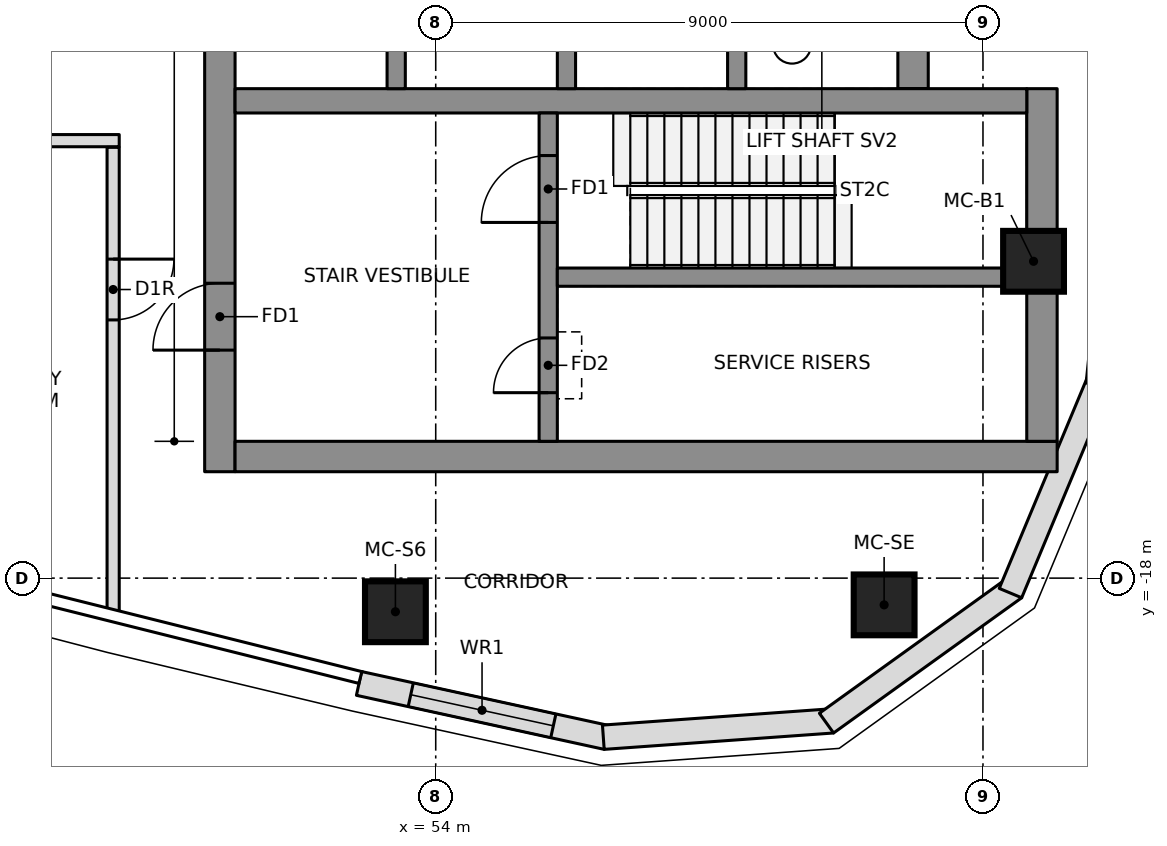
"""IFC4 building model, lengths in metres.
Left out: names, types, materials, properties, quantities, classifications, styles, units other than length and angle.
Written with IfcOpenShell. Run it as: python <this file> out.ifc"""

import sys

from ifc_helpers import new_model, si_unit, direction, frame, frame_2d, origin, origin_2d, place, context, subcontext, project, spatial, polyline, rectangle, outline, extrude, element, fill, save


model = new_model("IFC4")
c1 = context("Model", 3, precision=1e-05, world=origin(), true_north=direction((0.0, 1.0)))
c2 = subcontext(c1, "Body", "Model", "MODEL_VIEW")
j1 = project(units=[si_unit("LENGTHUNIT", "METRE"), si_unit("PLANEANGLEUNIT", "RADIAN")], contexts=[c1])
p1 = place(None, origin())
s1 = spatial("IfcSite", under=j1, at=p1, CompositionType="ELEMENT")
p2 = place(p1, origin())
s2 = spatial("IfcBuilding", under=s1, at=p2, CompositionType="ELEMENT")
p3 = place(p2, frame((0.0, 0.0, 308.6)))
s3 = spatial("IfcBuildingStorey", under=s2, at=p3, CompositionType="ELEMENT", Elevation=308.6)
p4 = place(p3, frame((50.45, -16.25, 0.0), z_axis=(0.0, 0.0, 1.0), x_axis=(0.0, 1.0, 0.0)))
e1 = element("IfcWall", 1, at=p4, inside=s3, PredefinedType="SHEAR", context=c2, shape_type="SweptSolid", body=[
    extrude(rectangle(XDim=9.6, YDim=0.5, at=frame_2d((4.8, 0.0))), origin(), (0.0, 0.0, 1.0), 4.6),
])
p5 = place(p4, frame((2.0, 0.0, 0.0)))
e2 = element("IfcOpeningElement", 2, at=p5, cuts=e1, PredefinedType="OPENING", context=c2, shape_type="SweptSolid", body=[
    extrude(rectangle(XDim=1.1, YDim=2.1, at=frame_2d((0.55, 1.05))), frame((0.0, 0.26, 0.0), z_axis=(0.0, -1.0, 0.0), x_axis=(1.0, 0.0, 0.0)), (0.0, 0.0, 1.0), 0.52),
])
p6 = place(p3, frame((50.7, -16.0, 0.0), z_axis=(0.0, 0.0, 1.0), x_axis=(1.0, 0.0, 0.0)))
e3 = element("IfcWall", 3, at=p6, inside=s3, PredefinedType="SHEAR", context=c2, shape_type="SweptSolid", body=[
    extrude(rectangle(XDim=13.52, YDim=0.5, at=frame_2d((6.76, 0.0))), origin(), (0.0, 0.0, 1.0), 4.6),
])
p7 = place(p3, frame((63.97, -15.75, 0.0), z_axis=(0.0, 0.0, 1.0), x_axis=(0.0, 1.0, 0.0)))
e4 = element("IfcWall", 4, at=p7, inside=s3, PredefinedType="SHEAR", context=c2, shape_type="SweptSolid", body=[
    extrude(rectangle(XDim=5.8, YDim=0.5, at=frame_2d((2.9, 0.0))), origin(), (0.0, 0.0, 1.0), 4.6),
])
p8 = place(p3, frame((61.85, -9.95, 0.0), z_axis=(0.0, 0.0, 1.0), x_axis=(0.0, 1.0, 0.0)))
e5 = element("IfcWall", 5, at=p8, inside=s3, PredefinedType="SHEAR", context=c2, shape_type="SweptSolid", body=[
    extrude(rectangle(XDim=19.9, YDim=0.5, at=frame_2d((9.95, 0.0))), origin(), (0.0, 0.0, 1.0), 4.6),
])
p9 = place(p3, frame((50.7, -10.15, 0.0), z_axis=(0.0, 0.0, 1.0), x_axis=(1.0, 0.0, 0.0)))
e6 = element("IfcWall", 6, at=p9, inside=s3, PredefinedType="SHEAR", context=c2, shape_type="SweptSolid", body=[
    extrude(rectangle(XDim=13.02, YDim=0.4, at=frame_2d((6.51, 0.0))), origin(), (0.0, 0.0, 1.0), 4.6),
])
for number, where, z_axis, x_axis in (
    (7, (53.35, -9.95, 0.0), (0.0, 0.0, 1.0), (0.0, 1.0, 0.0)),
    (8, (56.15, -9.95, 0.0), (0.0, 0.0, 1.0), (0.0, 1.0, 0.0)),
    (9, (58.95, -9.95, 0.0), (0.0, 0.0, 1.0), (0.0, 1.0, 0.0)),
):
    element("IfcWall", number, at=place(p3, frame(where, z_axis=z_axis, x_axis=x_axis)), inside=s3, PredefinedType="SHEAR", context=c2, shape_type="SweptSolid", body=[
        extrude(rectangle(XDim=3.0, YDim=0.3, at=frame_2d((1.5, 0.0))), origin(), (0.0, 0.0, 1.0), 4.6),
    ])
p10 = place(p3, frame((55.85, -15.75, 0.0), z_axis=(0.0, 0.0, 1.0), x_axis=(0.0, 1.0, 0.0)))
e10 = element("IfcWall", 10, at=p10, inside=s3, PredefinedType="SHEAR", context=c2, shape_type="SweptSolid", body=[
    extrude(rectangle(XDim=5.4, YDim=0.3, at=frame_2d((2.7, 0.0))), origin(), (0.0, 0.0, 1.0), 4.6),
])
p11 = place(p10, frame((3.6, 0.0, 0.0)))
e11 = element("IfcOpeningElement", 11, at=p11, cuts=e10, PredefinedType="OPENING", context=c2, shape_type="SweptSolid", body=[
    extrude(rectangle(XDim=1.1, YDim=2.1, at=frame_2d((0.55, 1.05))), frame((0.0, 0.16, 0.0), z_axis=(0.0, -1.0, 0.0), x_axis=(1.0, 0.0, 0.0)), (0.0, 0.0, 1.0), 0.32),
])
p12 = place(p10, frame((0.8, 0.0, 0.0)))
e12 = element("IfcOpeningElement", 12, at=p12, cuts=e10, PredefinedType="OPENING", context=c2, shape_type="SweptSolid", body=[
    extrude(rectangle(XDim=0.9, YDim=2.1, at=frame_2d((0.45, 1.05))), frame((0.0, 0.16, 0.0), z_axis=(0.0, -1.0, 0.0), x_axis=(1.0, 0.0, 0.0)), (0.0, 0.0, 1.0), 0.32),
])
p13 = place(p3, frame((56.0, -13.05, 0.0), z_axis=(0.0, 0.0, 1.0), x_axis=(1.0, 0.0, 0.0)))
e13 = element("IfcWall", 13, at=p13, inside=s3, PredefinedType="SHEAR", context=c2, shape_type="SweptSolid", body=[
    extrude(rectangle(XDim=7.72, YDim=0.3, at=frame_2d((3.86, 0.0))), origin(), (0.0, 0.0, 1.0), 4.6),
])
for number, where, z_axis, x_axis in (
    (14, (53.337, -18.553, 0.0), (0.0, 0.0, 1.0), (1.0, 0.0, 0.0)),
    (15, (61.374, -18.44, 0.0), (0.0, 0.0, 1.0), (1.0, 0.0, 0.0)),
    (16, (63.832, -12.789, 0.0), (0.0, 0.0, 1.0), (1.0, 0.0, 0.0)),
):
    element("IfcColumn", number, at=place(p3, frame(where, z_axis=z_axis, x_axis=x_axis)), inside=s3, PredefinedType="COLUMN", context=c2, shape_type="SweptSolid", body=[
        extrude(rectangle(XDim=1.0, YDim=1.0, at=origin_2d()), origin(), (0.0, 0.0, 1.0), 4.6),
    ])
p14 = place(p3, frame((52.738, -19.732, 0.0), z_axis=(0.0, 0.0, 1.0), x_axis=(0.977020225348, -0.213146614471, 0.0)))
e17 = element("IfcWall", 17, at=p14, inside=s3, PredefinedType="NOTDEFINED", context=c2, shape_type="SweptSolid", body=[
    extrude(outline(polyline([(0.0, -0.2), (4.171, -0.2), (4.113, 0.2), (0.0, 0.2), (0.0, -0.2)])), origin(), (0.0, 0.0, 1.0), 4.3),
])
p15 = place(p14, frame((0.871, 0.0, 0.3)))
e18 = element("IfcOpeningElement", 18, at=p15, cuts=e17, PredefinedType="OPENING", context=c2, shape_type="SweptSolid", body=[
    extrude(rectangle(XDim=2.4, YDim=3.0, at=frame_2d((1.2, 1.5))), frame((0.0, 0.21, 0.0), z_axis=(0.0, -1.0, 0.0), x_axis=(1.0, 0.0, 0.0)), (0.0, 0.0, 1.0), 0.42),
])
p16 = place(p3, frame((56.785, -20.615, 0.0), z_axis=(0.0, 0.0, 1.0), x_axis=(0.99746272096, 0.071190731806, 0.0)))
e19 = element("IfcWall", 19, at=p16, inside=s3, PredefinedType="NOTDEFINED", context=c2, shape_type="SweptSolid", body=[
    extrude(outline(polyline([(-0.029, -0.2), (3.753, -0.2), (3.64, 0.2), (0.029, 0.2), (-0.029, -0.2)])), origin(), (0.0, 0.0, 1.0), 4.3),
])
p17 = place(p3, frame((60.472, -20.352, 0.0), z_axis=(0.0, 0.0, 1.0), x_axis=(0.811962548682, 0.583709533533, 0.0)))
e20 = element("IfcWall", 20, at=p17, inside=s3, PredefinedType="NOTDEFINED", context=c2, shape_type="SweptSolid", body=[
    extrude(outline(polyline([(-0.057, -0.2), (3.753, -0.2), (3.64, 0.2), (0.057, 0.2), (-0.057, -0.2)])), origin(), (0.0, 0.0, 1.0), 4.3),
])
p18 = place(p3, frame((63.474, -18.194, 0.0), z_axis=(0.0, 0.0, 1.0), x_axis=(0.385285857918, 0.922797273343, 0.0)))
e21 = element("IfcWall", 21, at=p18, inside=s3, PredefinedType="NOTDEFINED", context=c2, shape_type="SweptSolid", body=[
    extrude(outline(polyline([(-0.057, -0.2), (3.726, -0.2), (3.667, 0.2), (0.057, 0.2), (-0.057, -0.2)])), origin(), (0.0, 0.0, 1.0), 4.3),
])
p19 = place(p3, frame((64.898, -14.782, 0.0), z_axis=(0.0, 0.0, 1.0), x_axis=(0.102249826987, 0.994758751096, 0.0)))
e22 = element("IfcWall", 22, at=p19, inside=s3, PredefinedType="NOTDEFINED", context=c2, shape_type="SweptSolid", body=[
    extrude(outline(polyline([(-0.03, -0.2), (4.237, -0.2), (4.23, 0.2), (0.03, 0.2), (-0.03, -0.2)])), origin(), (0.0, 0.0, 1.0), 4.3),
])
p20 = place(p19, frame((1.417, 0.0, 0.3)))
e23 = element("IfcOpeningElement", 23, at=p20, cuts=e22, PredefinedType="OPENING", context=c2, shape_type="SweptSolid", body=[
    extrude(rectangle(XDim=2.4, YDim=3.0, at=frame_2d((1.2, 1.5))), frame((0.0, 0.21, 0.0), z_axis=(0.0, -1.0, 0.0), x_axis=(1.0, 0.0, 0.0)), (0.0, 0.0, 1.0), 0.42),
])
p21 = place(p3, frame((43.199, -10.805, 0.0), z_axis=(0.0, 0.0, 1.0), x_axis=(0.999999999048, -4.3628114e-05, 0.0)))
e24 = element("IfcWall", 24, at=p21, inside=s3, PredefinedType="PARTITIONING", context=c2, shape_type="SweptSolid", body=[
    extrude(rectangle(XDim=5.596, YDim=0.2, at=frame_2d((2.798, 0.0))), origin(), (0.0, 0.0, 1.0), 4.3),
])
p22 = place(p21, frame((1.301, 0.0, 0.0)))
e25 = element("IfcOpeningElement", 25, at=p22, cuts=e24, PredefinedType="OPENING", context=c2, shape_type="SweptSolid", body=[
    extrude(rectangle(XDim=1.0, YDim=2.1, at=frame_2d((0.5, 1.05))), frame((0.0, 0.11, 0.0), z_axis=(0.0, -1.0, 0.0), x_axis=(1.0, 0.0, 0.0)), (0.0, 0.0, 1.0), 0.22),
])
p23 = place(p3, frame((48.695, -10.915, 0.0), z_axis=(0.0, 0.0, 1.0), x_axis=(0.0, -1.0, 0.0)))
e26 = element("IfcWall", 26, at=p23, inside=s3, PredefinedType="PARTITIONING", context=c2, shape_type="SweptSolid", body=[
    extrude(rectangle(XDim=7.674, YDim=0.2, at=frame_2d((3.837, 0.0))), origin(), (0.0, 0.0, 1.0), 4.3),
])
p24 = place(p23, frame((1.838, 0.0, 0.0)))
e27 = element("IfcOpeningElement", 27, at=p24, cuts=e26, PredefinedType="OPENING", context=c2, shape_type="SweptSolid", body=[
    extrude(rectangle(XDim=1.0, YDim=2.1, at=frame_2d((0.5, 1.05))), frame((0.0, 0.11, 0.0), z_axis=(0.0, -1.0, 0.0), x_axis=(1.0, 0.0, 0.0)), (0.0, 0.0, 1.0), 0.22),
])
p25 = place(p15, origin())
e28 = element("IfcWindow", 28, at=p25, inside=s3, PartitioningType="SINGLE_PANEL", PredefinedType="WINDOW", context=c2, shape_type="SweptSolid", body=[
    extrude(rectangle(XDim=2.4, YDim=3.0, at=frame_2d((1.2, 1.5))), frame((0.0, 0.17, 0.0), z_axis=(0.0, -1.0, 0.0), x_axis=(1.0, 0.0, 0.0)), (0.0, 0.0, 1.0), 0.06),
])
fill(e18, e28)
p26 = place(p24, origin())
e29 = element("IfcDoor", 29, at=p26, inside=s3, OperationType="SINGLE_SWING_RIGHT", PredefinedType="DOOR", context=c2, shape_type="SweptSolid", body=[
    extrude(rectangle(XDim=1.0, YDim=2.1, at=frame_2d((0.5, 1.05))), frame((0.0, 0.025, 0.0), z_axis=(0.0, -1.0, 0.0), x_axis=(1.0, 0.0, 0.0)), (0.0, 0.0, 1.0), 0.05),
])
fill(e27, e29)
p27 = place(p11, origin())
e30 = element("IfcDoor", 30, at=p27, inside=s3, OperationType="SINGLE_SWING_RIGHT", PredefinedType="DOOR", context=c2, shape_type="SweptSolid", body=[
    extrude(rectangle(XDim=1.1, YDim=2.1, at=frame_2d((0.55, 1.05))), frame((0.0, 0.025, 0.0), z_axis=(0.0, -1.0, 0.0), x_axis=(1.0, 0.0, 0.0)), (0.0, 0.0, 1.0), 0.05),
])
fill(e11, e30)
p28 = place(p5, origin())
e31 = element("IfcDoor", 31, at=p28, inside=s3, OperationType="SINGLE_SWING_RIGHT", PredefinedType="DOOR", context=c2, shape_type="SweptSolid", body=[
    extrude(rectangle(XDim=1.1, YDim=2.1, at=frame_2d((0.55, 1.05))), frame((0.0, 0.025, 0.0), z_axis=(0.0, -1.0, 0.0), x_axis=(1.0, 0.0, 0.0)), (0.0, 0.0, 1.0), 0.05),
])
fill(e2, e31)
p29 = place(p12, origin())
e32 = element("IfcDoor", 32, at=p29, inside=s3, OperationType="SINGLE_SWING_LEFT", PredefinedType="DOOR", context=c2, shape_type="SweptSolid", body=[
    extrude(rectangle(XDim=0.9, YDim=2.1, at=frame_2d((0.45, 1.05))), frame((0.0, 0.025, 0.0), z_axis=(0.0, -1.0, 0.0), x_axis=(1.0, 0.0, 0.0)), (0.0, 0.0, 1.0), 0.05),
])
fill(e12, e32)
save(model, sys.argv[1])
